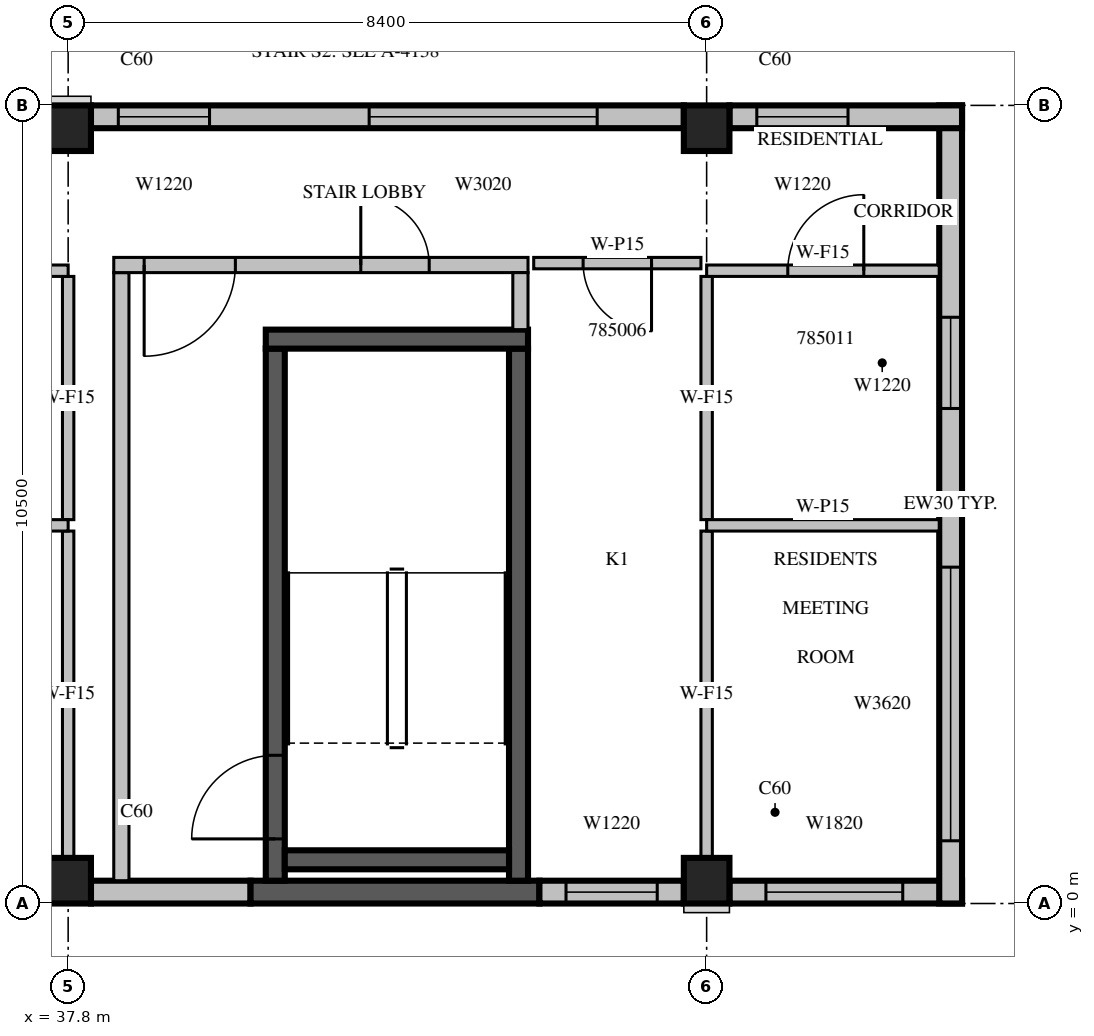
"""IFC4 building model, lengths in metres.
Left out: names, types, materials, properties, quantities, classifications, styles, units other than length and angle.
Written with IfcOpenShell. Run it as: python <this file> out.ifc"""

import sys

from ifc_helpers import new_model, si_unit, direction, frame, frame_2d, origin, origin_2d, place, context, subcontext, project, spatial, rectangle, extrude, source, transform, mapped, element, fill, save


model = new_model("IFC4")
c1 = context("Model", 3, precision=1e-05, world=origin(), true_north=direction((0.0, 1.0)))
c2 = subcontext(c1, "Body", "Model", "MODEL_VIEW")
j1 = project(units=[si_unit("LENGTHUNIT", "METRE"), si_unit("PLANEANGLEUNIT", "RADIAN")], contexts=[c1])
p1 = place(None, origin())
s1 = spatial("IfcSite", under=j1, at=p1, CompositionType="ELEMENT")
p2 = place(p1, origin())
s2 = spatial("IfcBuilding", under=s1, at=p2, CompositionType="ELEMENT")
p3 = place(p2, frame((0.0, 0.0, 358.0)))
s3 = spatial("IfcBuildingStorey", under=s2, at=p3, CompositionType="ELEMENT", Elevation=358.0)
m1 = source(origin(), c2, "Body", "SweptSolid", [
    extrude(rectangle(XDim=0.6, YDim=0.6, at=origin_2d()), origin(), (0.0, 0.0, 1.0), 3.5),
])
for number, where, z_axis, x_axis in (
    (1, (37.8, 0.3, 0.0), (0.0, 0.0, 1.0), (1.0, 0.0, 0.0)),
    (2, (46.2, 0.3, 0.0), (0.0, 0.0, 1.0), (1.0, 0.0, 0.0)),
    (3, (37.8, 10.2, 0.0), (0.0, 0.0, 1.0), (1.0, 0.0, 0.0)),
    (4, (46.2, 10.2, 0.0), (0.0, 0.0, 1.0), (1.0, 0.0, 0.0)),
):
    element("IfcColumn", number, at=place(p3, frame(where, z_axis=z_axis, x_axis=x_axis)), inside=s3, PredefinedType="COLUMN", context=c2, shape_type="MappedRepresentation", body=[
        mapped(m1, transform((0.0, 0.0, 0.0), scale=1.0)),
    ])
m2 = source(origin(), c2, "Body", "SweptSolid", [
    extrude(rectangle(XDim=2.1, YDim=0.3, at=frame_2d((1.05, 0.0))), origin(), (0.0, 0.0, 1.0), 3.1),
])
p4 = place(p3, frame((38.1, 0.15, 0.0), z_axis=(0.0, 0.0, 1.0), x_axis=(1.0, 0.0, 0.0)))
e5 = element("IfcWall", 5, at=p4, inside=s3, PredefinedType="STANDARD", context=c2, shape_type="MappedRepresentation", body=[
    mapped(m2, transform((0.0, 0.0, 0.0), scale=1.0)),
])
m3 = source(origin(), c2, "Body", "SweptSolid", [
    extrude(rectangle(XDim=3.8, YDim=0.3, at=frame_2d((1.9, 0.0))), origin(), (0.0, 0.0, 1.0), 3.1),
])
p5 = place(p3, frame((40.2, 0.15, 0.0), z_axis=(0.0, 0.0, 1.0), x_axis=(1.0, 0.0, 0.0)))
e6 = element("IfcWall", 6, at=p5, inside=s3, PredefinedType="SOLIDWALL", context=c2, shape_type="MappedRepresentation", body=[
    mapped(m3, transform((0.0, 0.0, 0.0), scale=1.0)),
])
m4 = source(origin(), c2, "Body", "SweptSolid", [
    extrude(rectangle(XDim=1.9, YDim=0.3, at=frame_2d((0.95, 0.0))), origin(), (0.0, 0.0, 1.0), 3.1),
])
p6 = place(p3, frame((44.0, 0.15, 0.0), z_axis=(0.0, 0.0, 1.0), x_axis=(1.0, 0.0, 0.0)))
e7 = element("IfcWall", 7, at=p6, inside=s3, PredefinedType="STANDARD", context=c2, shape_type="MappedRepresentation", body=[
    mapped(m4, transform((0.0, 0.0, 0.0), scale=1.0)),
])
m5 = source(origin(), c2, "Body", "SweptSolid", [
    extrude(rectangle(XDim=1.2, YDim=2.0, at=frame_2d((0.6, 1.0))), frame((0.0, 0.16, 0.0), z_axis=(0.0, -1.0, 0.0), x_axis=(1.0, 0.0, 0.0)), (0.0, 0.0, 1.0), 0.32),
])
p7 = place(p6, frame((0.35, 0.0, 0.6)))
e8 = element("IfcOpeningElement", 8, at=p7, cuts=e7, PredefinedType="OPENING", context=c2, shape_type="MappedRepresentation", body=[
    mapped(m5, transform((0.0, 0.0, 0.0), scale=1.0)),
])
m6 = source(origin(), c2, "Body", "SweptSolid", [
    extrude(rectangle(XDim=3.06, YDim=0.3, at=frame_2d((1.53, 0.0))), origin(), (0.0, 0.0, 1.0), 3.1),
])
p8 = place(p3, frame((46.5, 0.15, 0.0), z_axis=(0.0, 0.0, 1.0), x_axis=(1.0, 0.0, 0.0)))
e9 = element("IfcWall", 9, at=p8, inside=s3, PredefinedType="STANDARD", context=c2, shape_type="MappedRepresentation", body=[
    mapped(m6, transform((0.0, 0.0, 0.0), scale=1.0)),
])
m7 = source(origin(), c2, "Body", "SweptSolid", [
    extrude(rectangle(XDim=1.8, YDim=2.0, at=frame_2d((0.9, 1.0))), frame((0.0, 0.16, 0.0), z_axis=(0.0, -1.0, 0.0), x_axis=(1.0, 0.0, 0.0)), (0.0, 0.0, 1.0), 0.32),
])
p9 = place(p8, frame((0.48, 0.0, 0.6)))
e10 = element("IfcOpeningElement", 10, at=p9, cuts=e9, PredefinedType="OPENING", context=c2, shape_type="MappedRepresentation", body=[
    mapped(m7, transform((0.0, 0.0, 0.0), scale=1.0)),
])
m8 = source(origin(), c2, "Body", "SweptSolid", [
    extrude(rectangle(XDim=10.5, YDim=0.3, at=frame_2d((5.25, 0.0))), origin(), (0.0, 0.0, 1.0), 3.1),
])
p10 = place(p3, frame((49.41, 0.0, 0.0), z_axis=(0.0, 0.0, 1.0), x_axis=(0.0, 1.0, 0.0)))
e11 = element("IfcWall", 11, at=p10, inside=s3, PredefinedType="STANDARD", context=c2, shape_type="MappedRepresentation", body=[
    mapped(m8, transform((0.0, 0.0, 0.0), scale=1.0)),
])
m9 = source(origin(), c2, "Body", "SweptSolid", [
    extrude(rectangle(XDim=3.6, YDim=2.0, at=frame_2d((1.8, 1.0))), frame((0.0, 0.16, 0.0), z_axis=(0.0, -1.0, 0.0), x_axis=(1.0, 0.0, 0.0)), (0.0, 0.0, 1.0), 0.32),
])
p11 = place(p10, frame((0.825, 0.0, 0.6)))
e12 = element("IfcOpeningElement", 12, at=p11, cuts=e11, PredefinedType="OPENING", context=c2, shape_type="MappedRepresentation", body=[
    mapped(m9, transform((0.0, 0.0, 0.0), scale=1.0)),
])
p12 = place(p10, frame((6.513, 0.0, 0.6)))
e13 = element("IfcOpeningElement", 13, at=p12, cuts=e11, PredefinedType="OPENING", context=c2, shape_type="MappedRepresentation", body=[
    mapped(m5, transform((0.0, 0.0, 0.0), scale=1.0)),
])
p13 = place(p3, frame((49.56, 10.35, 0.0), z_axis=(0.0, 0.0, 1.0), x_axis=(-1.0, 0.0, 0.0)))
e14 = element("IfcWall", 14, at=p13, inside=s3, PredefinedType="STANDARD", context=c2, shape_type="MappedRepresentation", body=[
    mapped(m6, transform((0.0, 0.0, 0.0), scale=1.0)),
])
p14 = place(p13, frame((1.5, 0.0, 0.6)))
e15 = element("IfcOpeningElement", 15, at=p14, cuts=e14, PredefinedType="OPENING", context=c2, shape_type="MappedRepresentation", body=[
    mapped(m5, transform((0.0, 0.0, 0.0), scale=1.0)),
])
m10 = source(origin(), c2, "Body", "SweptSolid", [
    extrude(rectangle(XDim=7.8, YDim=0.3, at=frame_2d((3.9, 0.0))), origin(), (0.0, 0.0, 1.0), 3.1),
])
p15 = place(p3, frame((45.9, 10.35, 0.0), z_axis=(0.0, 0.0, 1.0), x_axis=(-1.0, 0.0, 0.0)))
e16 = element("IfcWall", 16, at=p15, inside=s3, PredefinedType="STANDARD", context=c2, shape_type="MappedRepresentation", body=[
    mapped(m10, transform((0.0, 0.0, 0.0), scale=1.0)),
])
m11 = source(origin(), c2, "Body", "SweptSolid", [
    extrude(rectangle(XDim=3.0, YDim=2.0, at=frame_2d((1.5, 1.0))), frame((0.0, 0.16, 0.0), z_axis=(0.0, -1.0, 0.0), x_axis=(1.0, 0.0, 0.0)), (0.0, 0.0, 1.0), 0.32),
])
p16 = place(p15, frame((1.14, 0.0, 0.6)))
e17 = element("IfcOpeningElement", 17, at=p16, cuts=e16, PredefinedType="OPENING", context=c2, shape_type="MappedRepresentation", body=[
    mapped(m11, transform((0.0, 0.0, 0.0), scale=1.0)),
])
p17 = place(p15, frame((6.24, 0.0, 0.6)))
e18 = element("IfcOpeningElement", 18, at=p17, cuts=e16, PredefinedType="OPENING", context=c2, shape_type="MappedRepresentation", body=[
    mapped(m5, transform((0.0, 0.0, 0.0), scale=1.0)),
])
m12 = source(origin(), c2, "Body", "SweptSolid", [
    extrude(rectangle(XDim=7.0, YDim=0.25, at=frame_2d((3.5, 0.0))), origin(), (0.0, 0.0, 1.0), 3.1),
])
p18 = place(p3, frame((40.525, 0.3, 0.0), z_axis=(0.0, 0.0, 1.0), x_axis=(0.0, 1.0, 0.0)))
e19 = element("IfcWall", 19, at=p18, inside=s3, PredefinedType="SOLIDWALL", context=c2, shape_type="MappedRepresentation", body=[
    mapped(m12, transform((0.0, 0.0, 0.0), scale=1.0)),
])
m13 = source(origin(), c2, "Body", "SweptSolid", [
    extrude(rectangle(XDim=1.1, YDim=2.1, at=frame_2d((0.55, 1.05))), frame((0.0, 0.135, 0.0), z_axis=(0.0, -1.0, 0.0), x_axis=(1.0, 0.0, 0.0)), (0.0, 0.0, 1.0), 0.27),
])
p19 = place(p18, frame((0.55, 0.0, 0.0)))
e20 = element("IfcOpeningElement", 20, at=p19, cuts=e19, PredefinedType="OPENING", context=c2, shape_type="MappedRepresentation", body=[
    mapped(m13, transform((0.0, 0.0, 0.0), scale=1.0)),
])
p20 = place(p3, frame((43.725, 0.3, 0.0), z_axis=(0.0, 0.0, 1.0), x_axis=(0.0, 1.0, 0.0)))
e21 = element("IfcWall", 21, at=p20, inside=s3, PredefinedType="SOLIDWALL", context=c2, shape_type="MappedRepresentation", body=[
    mapped(m12, transform((0.0, 0.0, 0.0), scale=1.0)),
])
m14 = source(origin(), c2, "Body", "SweptSolid", [
    extrude(rectangle(XDim=3.45, YDim=0.25, at=frame_2d((1.725, 0.0))), origin(), (0.0, 0.0, 1.0), 3.1),
])
p21 = place(p3, frame((40.4, 7.425, 0.0), z_axis=(0.0, 0.0, 1.0), x_axis=(1.0, 0.0, 0.0)))
e22 = element("IfcWall", 22, at=p21, inside=s3, PredefinedType="SOLIDWALL", context=c2, shape_type="MappedRepresentation", body=[
    mapped(m14, transform((0.0, 0.0, 0.0), scale=1.0)),
])
m15 = source(origin(), c2, "Body", "SweptSolid", [
    extrude(rectangle(XDim=2.95, YDim=0.25, at=frame_2d((1.475, 0.0))), origin(), (0.0, 0.0, 1.0), 3.1),
])
p22 = place(p3, frame((40.65, 0.575, 0.0), z_axis=(0.0, 0.0, 1.0), x_axis=(1.0, 0.0, 0.0)))
e23 = element("IfcWall", 23, at=p22, inside=s3, PredefinedType="SOLIDWALL", context=c2, shape_type="MappedRepresentation", body=[
    mapped(m15, transform((0.0, 0.0, 0.0), scale=1.0)),
])
m16 = source(origin(), c2, "Body", "SweptSolid", [
    extrude(rectangle(XDim=8.0, YDim=0.2, at=frame_2d((4.0, 0.0))), origin(), (0.0, 0.0, 1.0), 3.1),
])
p23 = place(p3, frame((38.5, 0.3, 0.0), z_axis=(0.0, 0.0, 1.0), x_axis=(0.0, 1.0, 0.0)))
e24 = element("IfcWall", 24, at=p23, inside=s3, PredefinedType="PARTITIONING", context=c2, shape_type="MappedRepresentation", body=[
    mapped(m16, transform((0.0, 0.0, 0.0), scale=1.0)),
])
m17 = source(origin(), c2, "Body", "SweptSolid", [
    extrude(rectangle(XDim=5.45, YDim=0.2, at=frame_2d((2.725, 0.0))), origin(), (0.0, 0.0, 1.0), 3.1),
])
p24 = place(p3, frame((38.4, 8.4, 0.0), z_axis=(0.0, 0.0, 1.0), x_axis=(1.0, 0.0, 0.0)))
e25 = element("IfcWall", 25, at=p24, inside=s3, PredefinedType="PARTITIONING", context=c2, shape_type="MappedRepresentation", body=[
    mapped(m17, transform((0.0, 0.0, 0.0), scale=1.0)),
])
m18 = source(origin(), c2, "Body", "SweptSolid", [
    extrude(rectangle(XDim=1.2, YDim=2.1, at=frame_2d((0.6, 1.05))), frame((0.0, 0.11, 0.0), z_axis=(0.0, -1.0, 0.0), x_axis=(1.0, 0.0, 0.0)), (0.0, 0.0, 1.0), 0.22),
])
p25 = place(p24, frame((0.4, 0.0, 0.0)))
e26 = element("IfcOpeningElement", 26, at=p25, cuts=e25, PredefinedType="OPENING", context=c2, shape_type="MappedRepresentation", body=[
    mapped(m18, transform((0.0, 0.0, 0.0), scale=1.0)),
])
m19 = source(origin(), c2, "Body", "SweptSolid", [
    extrude(rectangle(XDim=0.9, YDim=2.1, at=frame_2d((0.45, 1.05))), frame((0.0, 0.11, 0.0), z_axis=(0.0, -1.0, 0.0), x_axis=(1.0, 0.0, 0.0)), (0.0, 0.0, 1.0), 0.22),
])
p26 = place(p24, frame((3.25, 0.0, 0.0)))
e27 = element("IfcOpeningElement", 27, at=p26, cuts=e25, PredefinedType="OPENING", context=c2, shape_type="MappedRepresentation", body=[
    mapped(m19, transform((0.0, 0.0, 0.0), scale=1.0)),
])
m20 = source(origin(), c2, "Body", "SweptSolid", [
    extrude(rectangle(XDim=0.75, YDim=0.2, at=frame_2d((0.375, 0.0))), origin(), (0.0, 0.0, 1.0), 3.1),
])
p27 = place(p3, frame((43.75, 7.55, 0.0), z_axis=(0.0, 0.0, 1.0), x_axis=(0.0, 1.0, 0.0)))
e28 = element("IfcWall", 28, at=p27, inside=s3, PredefinedType="PARTITIONING", context=c2, shape_type="MappedRepresentation", body=[
    mapped(m20, transform((0.0, 0.0, 0.0), scale=1.0)),
])
m21 = source(origin(), c2, "Body", "SweptSolid", [
    extrude(rectangle(XDim=2.2, YDim=0.15, at=frame_2d((1.1, 0.0))), origin(), (0.0, 0.0, 1.0), 3.1),
])
p28 = place(p3, frame((46.125, 8.425, 0.0), z_axis=(0.0, 0.0, 1.0), x_axis=(-1.0, 0.0, 0.0)))
e29 = element("IfcWall", 29, at=p28, inside=s3, PredefinedType="PARTITIONING", context=c2, shape_type="MappedRepresentation", body=[
    mapped(m21, transform((0.0, 0.0, 0.0), scale=1.0)),
])
m22 = source(origin(), c2, "Body", "SweptSolid", [
    extrude(rectangle(XDim=0.9, YDim=2.1, at=frame_2d((0.45, 1.05))), frame((0.0, 0.085, 0.0), z_axis=(0.0, -1.0, 0.0), x_axis=(1.0, 0.0, 0.0)), (0.0, 0.0, 1.0), 0.17),
])
p29 = place(p28, frame((0.65, 0.0, 0.0)))
e30 = element("IfcOpeningElement", 30, at=p29, cuts=e29, PredefinedType="OPENING", context=c2, shape_type="MappedRepresentation", body=[
    mapped(m22, transform((0.0, 0.0, 0.0), scale=1.0)),
])
m23 = source(origin(), c2, "Body", "SweptSolid", [
    extrude(rectangle(XDim=4.301, YDim=0.15, at=frame_2d((2.151, 0.0))), origin(), (0.0, 0.0, 1.0), 3.1),
])
p30 = place(p3, frame((37.8, 0.599, 0.0), z_axis=(0.0, 0.0, 1.0), x_axis=(0.0, 1.0, 0.0)))
e31 = element("IfcWall", 31, at=p30, inside=s3, PredefinedType="PARTITIONING", context=c2, shape_type="MappedRepresentation", body=[
    mapped(m23, transform((0.0, 0.0, 0.0), scale=1.0)),
])
m24 = source(origin(), c2, "Body", "SweptSolid", [
    extrude(rectangle(XDim=3.2, YDim=0.15, at=frame_2d((1.6, 0.0))), origin(), (0.0, 0.0, 1.0), 3.1),
])
p31 = place(p3, frame((37.8, 5.05, 0.0), z_axis=(0.0, 0.0, 1.0), x_axis=(0.0, 1.0, 0.0)))
e32 = element("IfcWall", 32, at=p31, inside=s3, PredefinedType="PARTITIONING", context=c2, shape_type="MappedRepresentation", body=[
    mapped(m24, transform((0.0, 0.0, 0.0), scale=1.0)),
])
m25 = source(origin(), c2, "Body", "SweptSolid", [
    extrude(rectangle(XDim=8.4, YDim=0.15, at=frame_2d((4.2, 0.0))), origin(), (0.0, 0.0, 1.0), 3.1),
])
p32 = place(p3, frame((37.8, 4.975, 0.0), z_axis=(0.0, 0.0, 1.0), x_axis=(-1.0, 0.0, 0.0)))
e33 = element("IfcWall", 33, at=p32, inside=s3, PredefinedType="PARTITIONING", context=c2, shape_type="MappedRepresentation", body=[
    mapped(m25, transform((0.0, 0.0, 0.0), scale=1.0)),
])
m26 = source(origin(), c2, "Body", "SweptSolid", [
    extrude(rectangle(XDim=1.0, YDim=2.1, at=frame_2d((0.5, 1.05))), frame((0.0, 0.085, 0.0), z_axis=(0.0, -1.0, 0.0), x_axis=(1.0, 0.0, 0.0)), (0.0, 0.0, 1.0), 0.17),
])
p33 = place(p32, frame((3.608, 0.0, 0.0)))
e34 = element("IfcOpeningElement", 34, at=p33, cuts=e33, PredefinedType="OPENING", context=c2, shape_type="MappedRepresentation", body=[
    mapped(m26, transform((0.0, 0.0, 0.0), scale=1.0)),
])
p34 = place(p3, frame((46.2, 0.599, 0.0), z_axis=(0.0, 0.0, 1.0), x_axis=(0.0, 1.0, 0.0)))
e35 = element("IfcWall", 35, at=p34, inside=s3, PredefinedType="PARTITIONING", context=c2, shape_type="MappedRepresentation", body=[
    mapped(m23, transform((0.0, 0.0, 0.0), scale=1.0)),
])
p35 = place(p3, frame((46.2, 5.05, 0.0), z_axis=(0.0, 0.0, 1.0), x_axis=(0.0, 1.0, 0.0)))
e36 = element("IfcWall", 36, at=p35, inside=s3, PredefinedType="PARTITIONING", context=c2, shape_type="MappedRepresentation", body=[
    mapped(m24, transform((0.0, 0.0, 0.0), scale=1.0)),
])
m27 = source(origin(), c2, "Body", "SweptSolid", [
    extrude(rectangle(XDim=3.06, YDim=0.15, at=frame_2d((1.53, 0.0))), origin(), (0.0, 0.0, 1.0), 3.1),
])
p36 = place(p3, frame((49.26, 4.975, 0.0), z_axis=(0.0, 0.0, 1.0), x_axis=(-1.0, 0.0, 0.0)))
e37 = element("IfcWall", 37, at=p36, inside=s3, PredefinedType="PARTITIONING", context=c2, shape_type="MappedRepresentation", body=[
    mapped(m27, transform((0.0, 0.0, 0.0), scale=1.0)),
])
p37 = place(p3, frame((37.8, 8.325, 0.0), z_axis=(0.0, 0.0, 1.0), x_axis=(-1.0, 0.0, 0.0)))
e38 = element("IfcWall", 38, at=p37, inside=s3, PredefinedType="PARTITIONING", context=c2, shape_type="MappedRepresentation", body=[
    mapped(m25, transform((0.0, 0.0, 0.0), scale=1.0)),
])
p38 = place(p37, frame((3.658, 0.0, 0.0)))
e39 = element("IfcOpeningElement", 39, at=p38, cuts=e38, PredefinedType="OPENING", context=c2, shape_type="MappedRepresentation", body=[
    mapped(m26, transform((0.0, 0.0, 0.0), scale=1.0)),
])
p39 = place(p3, frame((49.26, 8.325, 0.0), z_axis=(0.0, 0.0, 1.0), x_axis=(-1.0, 0.0, 0.0)))
e40 = element("IfcWall", 40, at=p39, inside=s3, PredefinedType="PARTITIONING", context=c2, shape_type="MappedRepresentation", body=[
    mapped(m27, transform((0.0, 0.0, 0.0), scale=1.0)),
])
p40 = place(p39, frame((0.993, 0.0, 0.0)))
e41 = element("IfcOpeningElement", 41, at=p40, cuts=e40, PredefinedType="OPENING", context=c2, shape_type="MappedRepresentation", body=[
    mapped(m26, transform((0.0, 0.0, 0.0), scale=1.0)),
])
m28 = source(origin(), c2, "Body", "SweptSolid", [
    extrude(rectangle(XDim=1.2, YDim=2.0, at=frame_2d((0.6, 1.0))), frame((0.0, 0.03, 0.0), z_axis=(0.0, -1.0, 0.0), x_axis=(1.0, 0.0, 0.0)), (0.0, 0.0, 1.0), 0.06),
])
p41 = place(p7, origin())
e42 = element("IfcWindow", 42, at=p41, inside=s3, PartitioningType="SINGLE_PANEL", PredefinedType="WINDOW", context=c2, shape_type="MappedRepresentation", body=[
    mapped(m28, transform((0.0, 0.0, 0.0), scale=1.0)),
])
fill(e8, e42)
m29 = source(origin(), c2, "Body", "SweptSolid", [
    extrude(rectangle(XDim=1.8, YDim=2.0, at=frame_2d((0.9, 1.0))), frame((0.0, 0.03, 0.0), z_axis=(0.0, -1.0, 0.0), x_axis=(1.0, 0.0, 0.0)), (0.0, 0.0, 1.0), 0.06),
])
p42 = place(p9, origin())
e43 = element("IfcWindow", 43, at=p42, inside=s3, PartitioningType="SINGLE_PANEL", PredefinedType="WINDOW", context=c2, shape_type="MappedRepresentation", body=[
    mapped(m29, transform((0.0, 0.0, 0.0), scale=1.0)),
])
fill(e10, e43)
m30 = source(origin(), c2, "Body", "SweptSolid", [
    extrude(rectangle(XDim=3.6, YDim=2.0, at=frame_2d((1.8, 1.0))), frame((0.0, 0.03, 0.0), z_axis=(0.0, -1.0, 0.0), x_axis=(1.0, 0.0, 0.0)), (0.0, 0.0, 1.0), 0.06),
])
p43 = place(p11, origin())
e44 = element("IfcWindow", 44, at=p43, inside=s3, PartitioningType="SINGLE_PANEL", PredefinedType="WINDOW", context=c2, shape_type="MappedRepresentation", body=[
    mapped(m30, transform((0.0, 0.0, 0.0), scale=1.0)),
])
fill(e12, e44)
p44 = place(p12, origin())
e45 = element("IfcWindow", 45, at=p44, inside=s3, PartitioningType="SINGLE_PANEL", PredefinedType="WINDOW", context=c2, shape_type="MappedRepresentation", body=[
    mapped(m28, transform((0.0, 0.0, 0.0), scale=1.0)),
])
fill(e13, e45)
p45 = place(p14, origin())
e46 = element("IfcWindow", 46, at=p45, inside=s3, PartitioningType="SINGLE_PANEL", PredefinedType="WINDOW", context=c2, shape_type="MappedRepresentation", body=[
    mapped(m28, transform((0.0, 0.0, 0.0), scale=1.0)),
])
fill(e15, e46)
m31 = source(origin(), c2, "Body", "SweptSolid", [
    extrude(rectangle(XDim=3.0, YDim=2.0, at=frame_2d((1.5, 1.0))), frame((0.0, 0.03, 0.0), z_axis=(0.0, -1.0, 0.0), x_axis=(1.0, 0.0, 0.0)), (0.0, 0.0, 1.0), 0.06),
])
p46 = place(p16, origin())
e47 = element("IfcWindow", 47, at=p46, inside=s3, PartitioningType="SINGLE_PANEL", PredefinedType="WINDOW", context=c2, shape_type="MappedRepresentation", body=[
    mapped(m31, transform((0.0, 0.0, 0.0), scale=1.0)),
])
fill(e17, e47)
p47 = place(p17, origin())
e48 = element("IfcWindow", 48, at=p47, inside=s3, PartitioningType="SINGLE_PANEL", PredefinedType="WINDOW", context=c2, shape_type="MappedRepresentation", body=[
    mapped(m28, transform((0.0, 0.0, 0.0), scale=1.0)),
])
fill(e18, e48)
m32 = source(origin(), c2, "Body", "SweptSolid", [
    extrude(rectangle(XDim=1.1, YDim=2.1, at=frame_2d((0.55, 1.05))), frame((0.0, 0.025, 0.0), z_axis=(0.0, -1.0, 0.0), x_axis=(1.0, 0.0, 0.0)), (0.0, 0.0, 1.0), 0.05),
])
p48 = place(p19, origin())
e49 = element("IfcDoor", 49, at=p48, inside=s3, OperationType="SINGLE_SWING_LEFT", PredefinedType="DOOR", context=c2, shape_type="MappedRepresentation", body=[
    mapped(m32, transform((0.0, 0.0, 0.0), scale=1.0)),
])
fill(e20, e49)
m33 = source(origin(), c2, "Body", "SweptSolid", [
    extrude(rectangle(XDim=1.2, YDim=2.1, at=frame_2d((0.6, 1.05))), frame((0.0, 0.025, 0.0), z_axis=(0.0, -1.0, 0.0), x_axis=(1.0, 0.0, 0.0)), (0.0, 0.0, 1.0), 0.05),
])
p49 = place(p25, origin())
e50 = element("IfcDoor", 50, at=p49, inside=s3, OperationType="SINGLE_SWING_RIGHT", PredefinedType="DOOR", context=c2, shape_type="MappedRepresentation", body=[
    mapped(m33, transform((0.0, 0.0, 0.0), scale=1.0)),
])
fill(e26, e50)
m34 = source(origin(), c2, "Body", "SweptSolid", [
    extrude(rectangle(XDim=0.9, YDim=2.1, at=frame_2d((0.45, 1.05))), frame((0.0, 0.025, 0.0), z_axis=(0.0, -1.0, 0.0), x_axis=(1.0, 0.0, 0.0)), (0.0, 0.0, 1.0), 0.05),
])
p50 = place(p26, origin())
e51 = element("IfcDoor", 51, at=p50, inside=s3, OperationType="SINGLE_SWING_LEFT", PredefinedType="DOOR", context=c2, shape_type="MappedRepresentation", body=[
    mapped(m34, transform((0.0, 0.0, 0.0), scale=1.0)),
])
fill(e27, e51)
p51 = place(p29, origin())
e52 = element("IfcDoor", 52, at=p51, inside=s3, OperationType="SINGLE_SWING_LEFT", PredefinedType="DOOR", context=c2, shape_type="MappedRepresentation", body=[
    mapped(m34, transform((0.0, 0.0, 0.0), scale=1.0)),
])
fill(e30, e52)
m35 = source(origin(), c2, "Body", "SweptSolid", [
    extrude(rectangle(XDim=1.0, YDim=2.1, at=frame_2d((0.5, 1.05))), frame((0.0, 0.025, 0.0), z_axis=(0.0, -1.0, 0.0), x_axis=(1.0, 0.0, 0.0)), (0.0, 0.0, 1.0), 0.05),
])
p52 = place(p40, origin())
e53 = element("IfcDoor", 53, at=p52, inside=s3, OperationType="SINGLE_SWING_RIGHT", PredefinedType="DOOR", context=c2, shape_type="MappedRepresentation", body=[
    mapped(m35, transform((0.0, 0.0, 0.0), scale=1.0)),
])
fill(e41, e53)
save(model, sys.argv[1])
